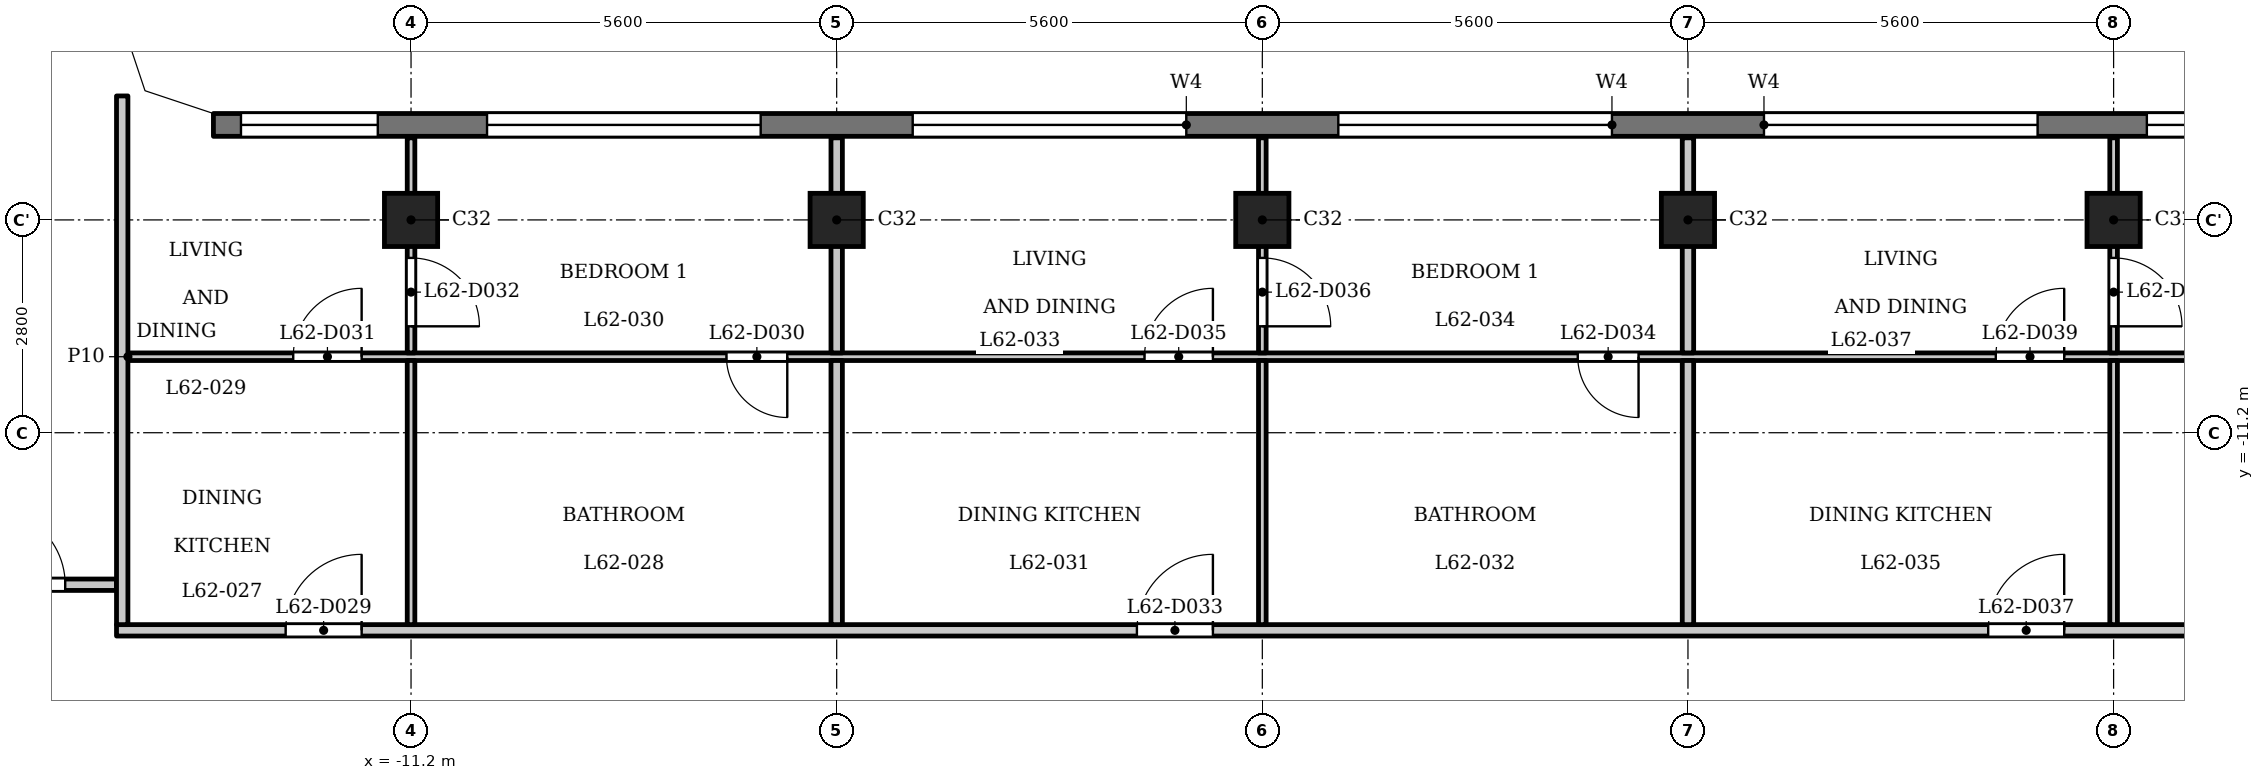
"""IFC4 building model, lengths in metres.
Left out: names, types, materials, properties, quantities, classifications, styles, units other than length and angle.
Written with IfcOpenShell. Run it as: python <this file> out.ifc"""

import sys

from ifc_helpers import new_model, si_unit, direction, frame, frame_2d, origin, origin_2d, place, context, subcontext, project, spatial, polyline, rectangle, outline, extrude, element, fill, save


model = new_model("IFC4")
c1 = context("Model", 3, precision=1e-05, world=origin(), true_north=direction((0.0, 1.0)))
c2 = subcontext(c1, "Body", "Model", "MODEL_VIEW")
j1 = project(units=[si_unit("LENGTHUNIT", "METRE"), si_unit("PLANEANGLEUNIT", "RADIAN")], contexts=[c1])
p1 = place(None, origin())
s1 = spatial("IfcSite", under=j1, at=p1, CompositionType="ELEMENT")
p2 = place(p1, origin())
s2 = spatial("IfcBuilding", under=s1, at=p2, CompositionType="ELEMENT")
p3 = place(p2, frame((0.0, 0.0, 241.7)))
s3 = spatial("IfcBuildingStorey", under=s2, at=p3, CompositionType="ELEMENT", Elevation=241.7)
for number, where, z_axis, x_axis in (
    (1, (-11.2, -8.4, 0.0), (0.0, 0.0, 1.0), (1.0, 0.0, 0.0)),
    (2, (-5.6, -8.4, 0.0), (0.0, 0.0, 1.0), (1.0, 0.0, 0.0)),
    (3, (0.0, -8.4, 0.0), (0.0, 0.0, 1.0), (1.0, 0.0, 0.0)),
    (4, (5.6, -8.4, 0.0), (0.0, 0.0, 1.0), (1.0, 0.0, 0.0)),
    (5, (11.2, -8.4, 0.0), (0.0, 0.0, 1.0), (1.0, 0.0, 0.0)),
):
    element("IfcColumn", number, at=place(p3, frame(where, z_axis=z_axis, x_axis=x_axis)), inside=s3, PredefinedType="COLUMN", context=c2, shape_type="SweptSolid", body=[
        extrude(rectangle(XDim=0.7, YDim=0.7, at=origin_2d()), origin(), (0.0, 0.0, 1.0), 3.5),
    ])
p4 = place(p3, frame((13.8, -7.15, 0.0), z_axis=(0.0, 0.0, 1.0), x_axis=(-1.0, 0.0, 0.0)))
e6 = element("IfcWall", 6, at=p4, inside=s3, PredefinedType="SOLIDWALL", context=c2, shape_type="SweptSolid", body=[
    extrude(rectangle(XDim=27.6, YDim=0.3, at=frame_2d((13.8, 0.0))), origin(), (0.0, 0.0, 1.0), 3.2),
])
p5 = place(p4, frame((0.363, 0.0, 0.9)))
e7 = element("IfcOpeningElement", 7, at=p5, cuts=e6, PredefinedType="OPENING", context=c2, shape_type="SweptSolid", body=[
    extrude(rectangle(XDim=1.8, YDim=1.25, at=frame_2d((0.9, 0.625))), frame((0.0, 0.16, 0.0), z_axis=(0.0, -1.0, 0.0), x_axis=(1.0, 0.0, 0.0)), (0.0, 0.0, 1.0), 0.32),
])
p6 = place(p4, frame((3.6, 0.0, 1.2)))
e8 = element("IfcOpeningElement", 8, at=p6, cuts=e6, PredefinedType="OPENING", context=c2, shape_type="SweptSolid", body=[
    extrude(rectangle(XDim=3.6, YDim=0.95, at=frame_2d((1.8, 0.475))), frame((0.0, 0.16, 0.0), z_axis=(0.0, -1.0, 0.0), x_axis=(1.0, 0.0, 0.0)), (0.0, 0.0, 1.0), 0.32),
])
p7 = place(p4, frame((9.2, 0.0, 1.2)))
e9 = element("IfcOpeningElement", 9, at=p7, cuts=e6, PredefinedType="OPENING", context=c2, shape_type="SweptSolid", body=[
    extrude(rectangle(XDim=3.6, YDim=0.95, at=frame_2d((1.8, 0.475))), frame((0.0, 0.16, 0.0), z_axis=(0.0, -1.0, 0.0), x_axis=(1.0, 0.0, 0.0)), (0.0, 0.0, 1.0), 0.32),
])
p8 = place(p4, frame((14.8, 0.0, 1.2)))
e10 = element("IfcOpeningElement", 10, at=p8, cuts=e6, PredefinedType="OPENING", context=c2, shape_type="SweptSolid", body=[
    extrude(rectangle(XDim=3.6, YDim=0.95, at=frame_2d((1.8, 0.475))), frame((0.0, 0.16, 0.0), z_axis=(0.0, -1.0, 0.0), x_axis=(1.0, 0.0, 0.0)), (0.0, 0.0, 1.0), 0.32),
])
p9 = place(p4, frame((20.4, 0.0, 1.2)))
e11 = element("IfcOpeningElement", 11, at=p9, cuts=e6, PredefinedType="OPENING", context=c2, shape_type="SweptSolid", body=[
    extrude(rectangle(XDim=3.6, YDim=0.95, at=frame_2d((1.8, 0.475))), frame((0.0, 0.16, 0.0), z_axis=(0.0, -1.0, 0.0), x_axis=(1.0, 0.0, 0.0)), (0.0, 0.0, 1.0), 0.32),
])
p10 = place(p4, frame((25.438, 0.0, 0.9)))
e12 = element("IfcOpeningElement", 12, at=p10, cuts=e6, PredefinedType="OPENING", context=c2, shape_type="SweptSolid", body=[
    extrude(rectangle(XDim=1.8, YDim=1.25, at=frame_2d((0.9, 0.625))), frame((0.0, 0.16, 0.0), z_axis=(0.0, -1.0, 0.0), x_axis=(1.0, 0.0, 0.0)), (0.0, 0.0, 1.0), 0.32),
])
p11 = place(p3, frame((-15.075, -13.8, 0.0), z_axis=(0.0, 0.0, 1.0), x_axis=(1.0, 0.0, 0.0)))
e13 = element("IfcWall", 13, at=p11, inside=s3, PredefinedType="PARTITIONING", context=c2, shape_type="SweptSolid", body=[
    extrude(rectangle(XDim=30.15, YDim=0.15, at=frame_2d((15.075, 0.0))), origin(), (0.0, 0.0, 1.0), 3.2),
])
p12 = place(p11, frame((2.225, 0.0, 0.0)))
e14 = element("IfcOpeningElement", 14, at=p12, cuts=e13, PredefinedType="OPENING", context=c2, shape_type="SweptSolid", body=[
    extrude(rectangle(XDim=1.0, YDim=2.1, at=frame_2d((0.5, 1.05))), frame((0.0, 0.085, 0.0), z_axis=(0.0, -1.0, 0.0), x_axis=(1.0, 0.0, 0.0)), (0.0, 0.0, 1.0), 0.17),
])
p13 = place(p11, frame((13.425, 0.0, 0.0)))
e15 = element("IfcOpeningElement", 15, at=p13, cuts=e13, PredefinedType="OPENING", context=c2, shape_type="SweptSolid", body=[
    extrude(rectangle(XDim=1.0, YDim=2.1, at=frame_2d((0.5, 1.05))), frame((0.0, 0.085, 0.0), z_axis=(0.0, -1.0, 0.0), x_axis=(1.0, 0.0, 0.0)), (0.0, 0.0, 1.0), 0.17),
])
p14 = place(p11, frame((24.625, 0.0, 0.0)))
e16 = element("IfcOpeningElement", 16, at=p14, cuts=e13, PredefinedType="OPENING", context=c2, shape_type="SweptSolid", body=[
    extrude(rectangle(XDim=1.0, YDim=2.1, at=frame_2d((0.5, 1.05))), frame((0.0, 0.085, 0.0), z_axis=(0.0, -1.0, 0.0), x_axis=(1.0, 0.0, 0.0)), (0.0, 0.0, 1.0), 0.17),
])
p15 = place(p3, frame((-17.4, -13.2, 0.0), z_axis=(0.0, 0.0, 1.0), x_axis=(1.0, 0.0, 0.0)))
e17 = element("IfcWall", 17, at=p15, inside=s3, PredefinedType="PARTITIONING", context=c2, shape_type="SweptSolid", body=[
    extrude(rectangle(XDim=2.325, YDim=0.15, at=frame_2d((1.163, 0.0))), origin(), (0.0, 0.0, 1.0), 3.2),
])
p16 = place(p15, frame((0.65, 0.0, 0.0)))
e18 = element("IfcOpeningElement", 18, at=p16, cuts=e17, PredefinedType="OPENING", context=c2, shape_type="SweptSolid", body=[
    extrude(rectangle(XDim=1.0, YDim=2.1, at=frame_2d((0.5, 1.05))), frame((0.0, 0.085, 0.0), z_axis=(0.0, -1.0, 0.0), x_axis=(1.0, 0.0, 0.0)), (0.0, 0.0, 1.0), 0.17),
])
p17 = place(p3, frame((-14.925, -10.2, 0.0), z_axis=(0.0, 0.0, 1.0), x_axis=(1.0, 0.0, 0.0)))
e19 = element("IfcWall", 19, at=p17, inside=s3, PredefinedType="PARTITIONING", context=c2, shape_type="SweptSolid", body=[
    extrude(rectangle(XDim=29.85, YDim=0.1, at=frame_2d((14.925, 0.0))), origin(), (0.0, 0.0, 1.0), 3.2),
])
p18 = place(p17, frame((7.875, 0.0, 0.0)))
e20 = element("IfcOpeningElement", 20, at=p18, cuts=e19, PredefinedType="OPENING", context=c2, shape_type="SweptSolid", body=[
    extrude(rectangle(XDim=0.8, YDim=2.1, at=frame_2d((0.4, 1.05))), frame((0.0, 0.06, 0.0), z_axis=(0.0, -1.0, 0.0), x_axis=(1.0, 0.0, 0.0)), (0.0, 0.0, 1.0), 0.12),
])
p19 = place(p17, frame((2.175, 0.0, 0.0)))
e21 = element("IfcOpeningElement", 21, at=p19, cuts=e19, PredefinedType="OPENING", context=c2, shape_type="SweptSolid", body=[
    extrude(rectangle(XDim=0.9, YDim=2.1, at=frame_2d((0.45, 1.05))), frame((0.0, 0.06, 0.0), z_axis=(0.0, -1.0, 0.0), x_axis=(1.0, 0.0, 0.0)), (0.0, 0.0, 1.0), 0.12),
])
p20 = place(p17, frame((19.075, 0.0, 0.0)))
e22 = element("IfcOpeningElement", 22, at=p20, cuts=e19, PredefinedType="OPENING", context=c2, shape_type="SweptSolid", body=[
    extrude(rectangle(XDim=0.8, YDim=2.1, at=frame_2d((0.4, 1.05))), frame((0.0, 0.06, 0.0), z_axis=(0.0, -1.0, 0.0), x_axis=(1.0, 0.0, 0.0)), (0.0, 0.0, 1.0), 0.12),
])
p21 = place(p17, frame((13.375, 0.0, 0.0)))
e23 = element("IfcOpeningElement", 23, at=p21, cuts=e19, PredefinedType="OPENING", context=c2, shape_type="SweptSolid", body=[
    extrude(rectangle(XDim=0.9, YDim=2.1, at=frame_2d((0.45, 1.05))), frame((0.0, 0.06, 0.0), z_axis=(0.0, -1.0, 0.0), x_axis=(1.0, 0.0, 0.0)), (0.0, 0.0, 1.0), 0.12),
])
p22 = place(p17, frame((28.525, 0.0, 0.0)))
e24 = element("IfcOpeningElement", 24, at=p22, cuts=e19, PredefinedType="OPENING", context=c2, shape_type="SweptSolid", body=[
    extrude(rectangle(XDim=0.8, YDim=2.1, at=frame_2d((0.4, 1.05))), frame((0.0, 0.06, 0.0), z_axis=(0.0, -1.0, 0.0), x_axis=(1.0, 0.0, 0.0)), (0.0, 0.0, 1.0), 0.12),
])
p23 = place(p17, frame((24.575, 0.0, 0.0)))
e25 = element("IfcOpeningElement", 25, at=p23, cuts=e19, PredefinedType="OPENING", context=c2, shape_type="SweptSolid", body=[
    extrude(rectangle(XDim=0.9, YDim=2.1, at=frame_2d((0.45, 1.05))), frame((0.0, 0.06, 0.0), z_axis=(0.0, -1.0, 0.0), x_axis=(1.0, 0.0, 0.0)), (0.0, 0.0, 1.0), 0.12),
])
p24 = place(p3, frame((-15.0, -13.725, 0.0), z_axis=(0.0, 0.0, 1.0), x_axis=(0.0, 1.0, 0.0)))
e26 = element("IfcWall", 26, at=p24, inside=s3, PredefinedType="PARTITIONING", context=c2, shape_type="SweptSolid", body=[
    extrude(rectangle(XDim=6.956, YDim=0.15, at=frame_2d((3.478, 0.0))), origin(), (0.0, 0.0, 1.0), 3.2),
])
p25 = place(p3, frame((-11.2, -13.725, 0.0), z_axis=(0.0, 0.0, 1.0), x_axis=(0.0, 1.0, 0.0)))
e27 = element("IfcWall", 27, at=p25, inside=s3, PredefinedType="PARTITIONING", context=c2, shape_type="SweptSolid", body=[
    extrude(rectangle(XDim=3.475, YDim=0.1, at=frame_2d((1.738, 0.0))), origin(), (0.0, 0.0, 1.0), 3.2),
])
p26 = place(p3, frame((-11.2, -10.15, 0.0), z_axis=(0.0, 0.0, 1.0), x_axis=(0.0, 1.0, 0.0)))
e28 = element("IfcWall", 28, at=p26, inside=s3, PredefinedType="PARTITIONING", context=c2, shape_type="SweptSolid", body=[
    extrude(rectangle(XDim=2.83, YDim=0.1, at=frame_2d((1.415, 0.0))), origin(), (0.0, 0.0, 1.0), 3.2),
])
p27 = place(p26, frame((0.35, 0.0, 0.0)))
e29 = element("IfcOpeningElement", 29, at=p27, cuts=e28, PredefinedType="OPENING", context=c2, shape_type="SweptSolid", body=[
    extrude(rectangle(XDim=0.9, YDim=2.1, at=frame_2d((0.45, 1.05))), frame((0.0, 0.06, 0.0), z_axis=(0.0, -1.0, 0.0), x_axis=(1.0, 0.0, 0.0)), (0.0, 0.0, 1.0), 0.12),
])
p28 = place(p3, frame((-5.6, -13.725, 0.0), z_axis=(0.0, 0.0, 1.0), x_axis=(0.0, 1.0, 0.0)))
e30 = element("IfcWall", 30, at=p28, inside=s3, PredefinedType="PARTITIONING", context=c2, shape_type="SweptSolid", body=[
    extrude(rectangle(XDim=3.475, YDim=0.15, at=frame_2d((1.738, 0.0))), origin(), (0.0, 0.0, 1.0), 3.2),
])
p29 = place(p3, frame((-5.6, -10.15, 0.0), z_axis=(0.0, 0.0, 1.0), x_axis=(0.0, 1.0, 0.0)))
e31 = element("IfcWall", 31, at=p29, inside=s3, PredefinedType="PARTITIONING", context=c2, shape_type="SweptSolid", body=[
    extrude(rectangle(XDim=2.83, YDim=0.15, at=frame_2d((1.415, 0.0))), origin(), (0.0, 0.0, 1.0), 3.2),
])
p30 = place(p3, frame((0.0, -13.725, 0.0), z_axis=(0.0, 0.0, 1.0), x_axis=(0.0, 1.0, 0.0)))
e32 = element("IfcWall", 32, at=p30, inside=s3, PredefinedType="PARTITIONING", context=c2, shape_type="SweptSolid", body=[
    extrude(rectangle(XDim=3.475, YDim=0.1, at=frame_2d((1.738, 0.0))), origin(), (0.0, 0.0, 1.0), 3.2),
])
p31 = place(p3, frame((0.0, -10.15, 0.0), z_axis=(0.0, 0.0, 1.0), x_axis=(0.0, 1.0, 0.0)))
e33 = element("IfcWall", 33, at=p31, inside=s3, PredefinedType="PARTITIONING", context=c2, shape_type="SweptSolid", body=[
    extrude(rectangle(XDim=2.83, YDim=0.1, at=frame_2d((1.415, 0.0))), origin(), (0.0, 0.0, 1.0), 3.2),
])
p32 = place(p31, frame((0.35, 0.0, 0.0)))
e34 = element("IfcOpeningElement", 34, at=p32, cuts=e33, PredefinedType="OPENING", context=c2, shape_type="SweptSolid", body=[
    extrude(rectangle(XDim=0.9, YDim=2.1, at=frame_2d((0.45, 1.05))), frame((0.0, 0.06, 0.0), z_axis=(0.0, -1.0, 0.0), x_axis=(1.0, 0.0, 0.0)), (0.0, 0.0, 1.0), 0.12),
])
p33 = place(p3, frame((5.6, -13.725, 0.0), z_axis=(0.0, 0.0, 1.0), x_axis=(0.0, 1.0, 0.0)))
e35 = element("IfcWall", 35, at=p33, inside=s3, PredefinedType="PARTITIONING", context=c2, shape_type="SweptSolid", body=[
    extrude(rectangle(XDim=3.475, YDim=0.15, at=frame_2d((1.738, 0.0))), origin(), (0.0, 0.0, 1.0), 3.2),
])
p34 = place(p3, frame((5.6, -10.15, 0.0), z_axis=(0.0, 0.0, 1.0), x_axis=(0.0, 1.0, 0.0)))
e36 = element("IfcWall", 36, at=p34, inside=s3, PredefinedType="PARTITIONING", context=c2, shape_type="SweptSolid", body=[
    extrude(rectangle(XDim=2.83, YDim=0.15, at=frame_2d((1.415, 0.0))), origin(), (0.0, 0.0, 1.0), 3.2),
])
p35 = place(p3, frame((11.2, -13.725, 0.0), z_axis=(0.0, 0.0, 1.0), x_axis=(0.0, 1.0, 0.0)))
e37 = element("IfcWall", 37, at=p35, inside=s3, PredefinedType="PARTITIONING", context=c2, shape_type="SweptSolid", body=[
    extrude(rectangle(XDim=3.475, YDim=0.1, at=frame_2d((1.738, 0.0))), origin(), (0.0, 0.0, 1.0), 3.2),
])
p36 = place(p3, frame((11.2, -10.15, 0.0), z_axis=(0.0, 0.0, 1.0), x_axis=(0.0, 1.0, 0.0)))
e38 = element("IfcWall", 38, at=p36, inside=s3, PredefinedType="PARTITIONING", context=c2, shape_type="SweptSolid", body=[
    extrude(rectangle(XDim=2.83, YDim=0.1, at=frame_2d((1.415, 0.0))), origin(), (0.0, 0.0, 1.0), 3.2),
])
p37 = place(p36, frame((0.35, 0.0, 0.0)))
e39 = element("IfcOpeningElement", 39, at=p37, cuts=e38, PredefinedType="OPENING", context=c2, shape_type="SweptSolid", body=[
    extrude(rectangle(XDim=0.9, YDim=2.1, at=frame_2d((0.45, 1.05))), frame((0.0, 0.06, 0.0), z_axis=(0.0, -1.0, 0.0), x_axis=(1.0, 0.0, 0.0)), (0.0, 0.0, 1.0), 0.12),
])
p38 = place(p3, origin())
e40 = element("IfcWall", 40, at=p38, inside=s3, PredefinedType="SOLIDWALL", context=c2, shape_type="SweptSolid", body=[
    extrude(outline(polyline([(-14.937, -6.937), (-13.849, -7.3), (-13.8, -7.3), (-13.8, -7.0), (-14.7, -6.7), (-15.0, -5.8), (-15.3, -5.8), (-15.3, -5.849), (-14.937, -6.937)])), origin(), (0.0, 0.0, 1.0), 3.2),
])
p39 = place(p16, origin())
e41 = element("IfcDoor", 41, at=p39, inside=s3, OperationType="SINGLE_SWING_RIGHT", PredefinedType="DOOR", context=c2, shape_type="SweptSolid", body=[
    extrude(rectangle(XDim=1.0, YDim=2.1, at=frame_2d((0.5, 1.05))), frame((0.0, 0.025, 0.0), z_axis=(0.0, -1.0, 0.0), x_axis=(1.0, 0.0, 0.0)), (0.0, 0.0, 1.0), 0.05),
])
fill(e18, e41)
p40 = place(p12, origin())
e42 = element("IfcDoor", 42, at=p40, inside=s3, OperationType="SINGLE_SWING_LEFT", PredefinedType="DOOR", context=c2, shape_type="SweptSolid", body=[
    extrude(rectangle(XDim=1.0, YDim=2.1, at=frame_2d((0.5, 1.05))), frame((0.0, 0.025, 0.0), z_axis=(0.0, -1.0, 0.0), x_axis=(1.0, 0.0, 0.0)), (0.0, 0.0, 1.0), 0.05),
])
fill(e14, e42)
p41 = place(p18, origin())
e43 = element("IfcDoor", 43, at=p41, inside=s3, OperationType="SINGLE_SWING_RIGHT", PredefinedType="DOOR", context=c2, shape_type="SweptSolid", body=[
    extrude(rectangle(XDim=0.8, YDim=2.1, at=frame_2d((0.4, 1.05))), frame((0.0, 0.025, 0.0), z_axis=(0.0, -1.0, 0.0), x_axis=(1.0, 0.0, 0.0)), (0.0, 0.0, 1.0), 0.05),
])
fill(e20, e43)
p42 = place(p19, origin())
e44 = element("IfcDoor", 44, at=p42, inside=s3, OperationType="SINGLE_SWING_LEFT", PredefinedType="DOOR", context=c2, shape_type="SweptSolid", body=[
    extrude(rectangle(XDim=0.9, YDim=2.1, at=frame_2d((0.45, 1.05))), frame((0.0, 0.025, 0.0), z_axis=(0.0, -1.0, 0.0), x_axis=(1.0, 0.0, 0.0)), (0.0, 0.0, 1.0), 0.05),
])
fill(e21, e44)
p43 = place(p27, origin())
e45 = element("IfcDoor", 45, at=p43, inside=s3, OperationType="SINGLE_SWING_LEFT", PredefinedType="DOOR", context=c2, shape_type="SweptSolid", body=[
    extrude(rectangle(XDim=0.9, YDim=2.1, at=frame_2d((0.45, 1.05))), frame((0.0, 0.025, 0.0), z_axis=(0.0, -1.0, 0.0), x_axis=(1.0, 0.0, 0.0)), (0.0, 0.0, 1.0), 0.05),
])
fill(e29, e45)
p44 = place(p13, origin())
e46 = element("IfcDoor", 46, at=p44, inside=s3, OperationType="SINGLE_SWING_LEFT", PredefinedType="DOOR", context=c2, shape_type="SweptSolid", body=[
    extrude(rectangle(XDim=1.0, YDim=2.1, at=frame_2d((0.5, 1.05))), frame((0.0, 0.025, 0.0), z_axis=(0.0, -1.0, 0.0), x_axis=(1.0, 0.0, 0.0)), (0.0, 0.0, 1.0), 0.05),
])
fill(e15, e46)
p45 = place(p20, origin())
e47 = element("IfcDoor", 47, at=p45, inside=s3, OperationType="SINGLE_SWING_RIGHT", PredefinedType="DOOR", context=c2, shape_type="SweptSolid", body=[
    extrude(rectangle(XDim=0.8, YDim=2.1, at=frame_2d((0.4, 1.05))), frame((0.0, 0.025, 0.0), z_axis=(0.0, -1.0, 0.0), x_axis=(1.0, 0.0, 0.0)), (0.0, 0.0, 1.0), 0.05),
])
fill(e22, e47)
p46 = place(p21, origin())
e48 = element("IfcDoor", 48, at=p46, inside=s3, OperationType="SINGLE_SWING_LEFT", PredefinedType="DOOR", context=c2, shape_type="SweptSolid", body=[
    extrude(rectangle(XDim=0.9, YDim=2.1, at=frame_2d((0.45, 1.05))), frame((0.0, 0.025, 0.0), z_axis=(0.0, -1.0, 0.0), x_axis=(1.0, 0.0, 0.0)), (0.0, 0.0, 1.0), 0.05),
])
fill(e23, e48)
p47 = place(p32, origin())
e49 = element("IfcDoor", 49, at=p47, inside=s3, OperationType="SINGLE_SWING_LEFT", PredefinedType="DOOR", context=c2, shape_type="SweptSolid", body=[
    extrude(rectangle(XDim=0.9, YDim=2.1, at=frame_2d((0.45, 1.05))), frame((0.0, 0.025, 0.0), z_axis=(0.0, -1.0, 0.0), x_axis=(1.0, 0.0, 0.0)), (0.0, 0.0, 1.0), 0.05),
])
fill(e34, e49)
p48 = place(p14, origin())
e50 = element("IfcDoor", 50, at=p48, inside=s3, OperationType="SINGLE_SWING_LEFT", PredefinedType="DOOR", context=c2, shape_type="SweptSolid", body=[
    extrude(rectangle(XDim=1.0, YDim=2.1, at=frame_2d((0.5, 1.05))), frame((0.0, 0.025, 0.0), z_axis=(0.0, -1.0, 0.0), x_axis=(1.0, 0.0, 0.0)), (0.0, 0.0, 1.0), 0.05),
])
fill(e16, e50)
p49 = place(p23, origin())
e51 = element("IfcDoor", 51, at=p49, inside=s3, OperationType="SINGLE_SWING_LEFT", PredefinedType="DOOR", context=c2, shape_type="SweptSolid", body=[
    extrude(rectangle(XDim=0.9, YDim=2.1, at=frame_2d((0.45, 1.05))), frame((0.0, 0.025, 0.0), z_axis=(0.0, -1.0, 0.0), x_axis=(1.0, 0.0, 0.0)), (0.0, 0.0, 1.0), 0.05),
])
fill(e25, e51)
p50 = place(p37, origin())
e52 = element("IfcDoor", 52, at=p50, inside=s3, OperationType="SINGLE_SWING_LEFT", PredefinedType="DOOR", context=c2, shape_type="SweptSolid", body=[
    extrude(rectangle(XDim=0.9, YDim=2.1, at=frame_2d((0.45, 1.05))), frame((0.0, 0.025, 0.0), z_axis=(0.0, -1.0, 0.0), x_axis=(1.0, 0.0, 0.0)), (0.0, 0.0, 1.0), 0.05),
])
fill(e39, e52)
p51 = place(p5, origin())
e53 = element("IfcWindow", 53, at=p51, inside=s3, PartitioningType="SINGLE_PANEL", PredefinedType="WINDOW", context=c2, shape_type="SweptSolid", body=[
    extrude(rectangle(XDim=1.8, YDim=1.25, at=frame_2d((0.9, 0.625))), frame((0.0, 0.03, 0.0), z_axis=(0.0, -1.0, 0.0), x_axis=(1.0, 0.0, 0.0)), (0.0, 0.0, 1.0), 0.06),
])
fill(e7, e53)
p52 = place(p6, origin())
e54 = element("IfcWindow", 54, at=p52, inside=s3, PartitioningType="SINGLE_PANEL", PredefinedType="WINDOW", context=c2, shape_type="SweptSolid", body=[
    extrude(rectangle(XDim=3.6, YDim=0.95, at=frame_2d((1.8, 0.475))), frame((0.0, 0.03, 0.0), z_axis=(0.0, -1.0, 0.0), x_axis=(1.0, 0.0, 0.0)), (0.0, 0.0, 1.0), 0.06),
])
fill(e8, e54)
p53 = place(p7, origin())
e55 = element("IfcWindow", 55, at=p53, inside=s3, PartitioningType="SINGLE_PANEL", PredefinedType="WINDOW", context=c2, shape_type="SweptSolid", body=[
    extrude(rectangle(XDim=3.6, YDim=0.95, at=frame_2d((1.8, 0.475))), frame((0.0, 0.03, 0.0), z_axis=(0.0, -1.0, 0.0), x_axis=(1.0, 0.0, 0.0)), (0.0, 0.0, 1.0), 0.06),
])
fill(e9, e55)
p54 = place(p8, origin())
e56 = element("IfcWindow", 56, at=p54, inside=s3, PartitioningType="SINGLE_PANEL", PredefinedType="WINDOW", context=c2, shape_type="SweptSolid", body=[
    extrude(rectangle(XDim=3.6, YDim=0.95, at=frame_2d((1.8, 0.475))), frame((0.0, 0.03, 0.0), z_axis=(0.0, -1.0, 0.0), x_axis=(1.0, 0.0, 0.0)), (0.0, 0.0, 1.0), 0.06),
])
fill(e10, e56)
p55 = place(p9, origin())
e57 = element("IfcWindow", 57, at=p55, inside=s3, PartitioningType="SINGLE_PANEL", PredefinedType="WINDOW", context=c2, shape_type="SweptSolid", body=[
    extrude(rectangle(XDim=3.6, YDim=0.95, at=frame_2d((1.8, 0.475))), frame((0.0, 0.03, 0.0), z_axis=(0.0, -1.0, 0.0), x_axis=(1.0, 0.0, 0.0)), (0.0, 0.0, 1.0), 0.06),
])
fill(e11, e57)
p56 = place(p10, origin())
e58 = element("IfcWindow", 58, at=p56, inside=s3, PartitioningType="SINGLE_PANEL", PredefinedType="WINDOW", context=c2, shape_type="SweptSolid", body=[
    extrude(rectangle(XDim=1.8, YDim=1.25, at=frame_2d((0.9, 0.625))), frame((0.0, 0.03, 0.0), z_axis=(0.0, -1.0, 0.0), x_axis=(1.0, 0.0, 0.0)), (0.0, 0.0, 1.0), 0.06),
])
fill(e12, e58)
save(model, sys.argv[1])
